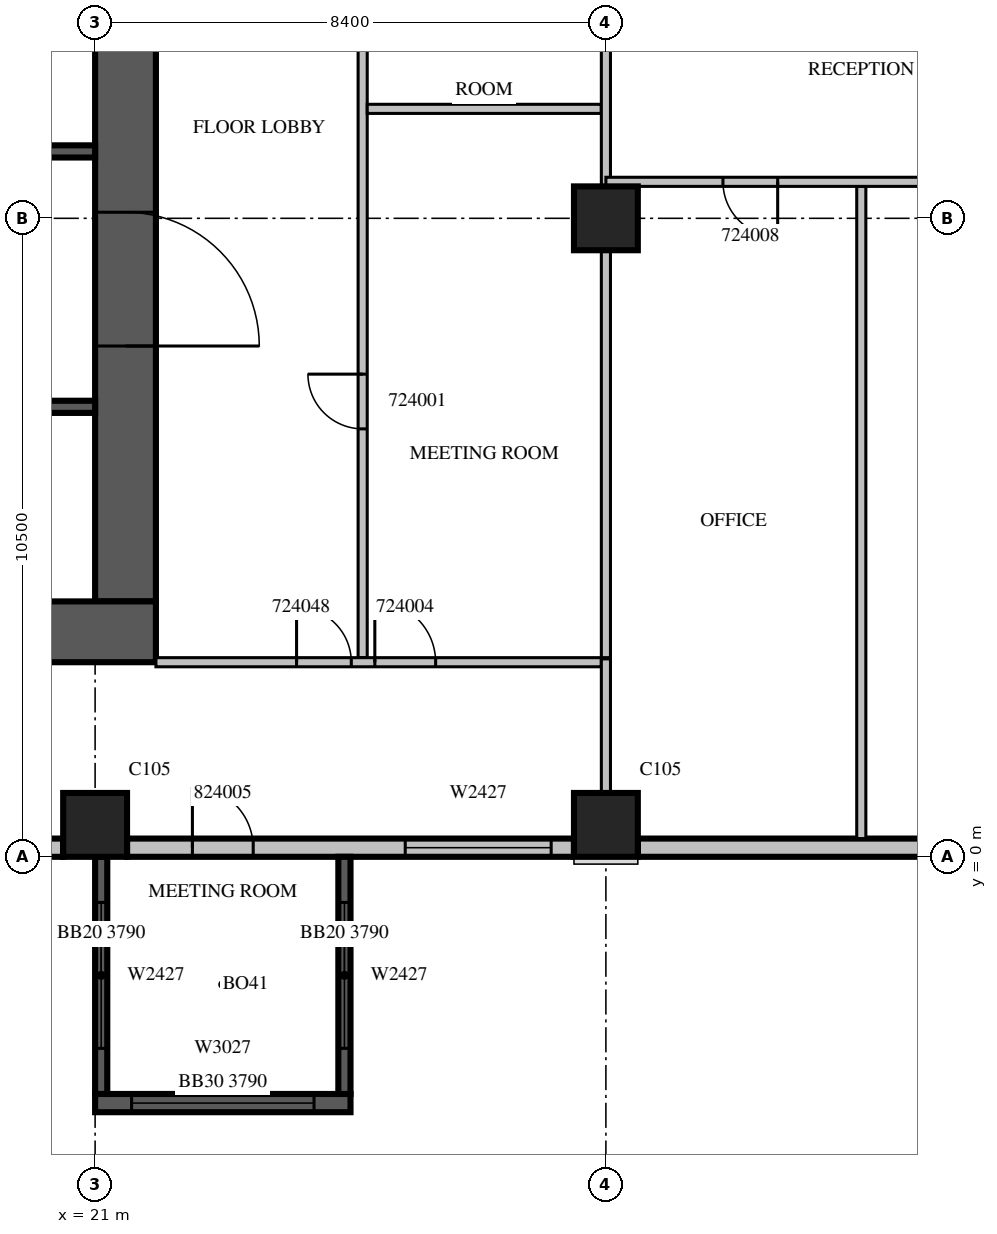
"""IFC4 building model, lengths in metres.
Left out: names, types, materials, properties, quantities, classifications, styles, units other than length and angle.
Written with IfcOpenShell. Run it as: python <this file> out.ifc"""

import sys

from ifc_helpers import new_model, si_unit, direction, frame, frame_2d, origin, origin_2d, place, context, subcontext, project, spatial, rectangle, extrude, source, transform, mapped, element, fill, save


model = new_model("IFC4")
c1 = context("Model", 3, precision=1e-05, world=origin(), true_north=direction((0.0, 1.0)))
c2 = subcontext(c1, "Body", "Model", "MODEL_VIEW")
j1 = project(units=[si_unit("LENGTHUNIT", "METRE"), si_unit("PLANEANGLEUNIT", "RADIAN")], contexts=[c1])
p1 = place(None, origin())
s1 = spatial("IfcSite", under=j1, at=p1, CompositionType="ELEMENT")
p2 = place(p1, origin())
s2 = spatial("IfcBuilding", under=s1, at=p2, CompositionType="ELEMENT")
p3 = place(p2, frame((0.0, 0.0, 111.9)))
s3 = spatial("IfcBuildingStorey", under=s2, at=p3, CompositionType="ELEMENT", Elevation=111.9)
m1 = source(origin(), c2, "Body", "SweptSolid", [
    extrude(rectangle(XDim=1.05, YDim=1.05, at=origin_2d()), origin(), (0.0, 0.0, 1.0), 4.2),
])
for number, where, z_axis, x_axis in (
    (1, (21.0, 0.525, 0.0), (0.0, 0.0, 1.0), (1.0, 0.0, 0.0)),
    (2, (29.4, 0.525, 0.0), (0.0, 0.0, 1.0), (1.0, 0.0, 0.0)),
    (3, (29.4, 10.5, 0.0), (0.0, 0.0, 1.0), (1.0, 0.0, 0.0)),
):
    element("IfcColumn", number, at=place(p3, frame(where, z_axis=z_axis, x_axis=x_axis)), inside=s3, PredefinedType="COLUMN", context=c2, shape_type="MappedRepresentation", body=[
        mapped(m1, transform((0.0, 0.0, 0.0), scale=1.0)),
    ])
m2 = source(origin(), c2, "Body", "SweptSolid", [
    extrude(rectangle(XDim=16.8, YDim=1.0, at=frame_2d((8.4, 0.0))), origin(), (0.0, 0.0, 1.0), 4.2),
])
p4 = place(p3, frame((21.5, 4.2, 0.0), z_axis=(0.0, 0.0, 1.0), x_axis=(0.0, 1.0, 0.0)))
e4 = element("IfcWall", 4, at=p4, inside=s3, PredefinedType="SHEAR", context=c2, shape_type="MappedRepresentation", body=[
    mapped(m2, transform((0.0, 0.0, 0.0), scale=1.0)),
])
m3 = source(origin(), c2, "Body", "SweptSolid", [
    extrude(rectangle(XDim=2.2, YDim=2.1, at=frame_2d((1.1, 1.05))), frame((0.0, 0.51, 0.0), z_axis=(0.0, -1.0, 0.0), x_axis=(1.0, 0.0, 0.0)), (0.0, 0.0, 1.0), 1.02),
])
p5 = place(p4, frame((4.2, 0.0, 0.0)))
e5 = element("IfcOpeningElement", 5, at=p5, cuts=e4, PredefinedType="OPENING", context=c2, shape_type="MappedRepresentation", body=[
    mapped(m3, transform((0.0, 0.0, 0.0), scale=1.0)),
])
m4 = source(origin(), c2, "Body", "SweptSolid", [
    extrude(rectangle(XDim=1.2, YDim=2.1, at=frame_2d((0.6, 1.05))), frame((0.0, 0.51, 0.0), z_axis=(0.0, -1.0, 0.0), x_axis=(1.0, 0.0, 0.0)), (0.0, 0.0, 1.0), 1.02),
])
p6 = place(p4, frame((14.7, 0.0, 0.0)))
e6 = element("IfcOpeningElement", 6, at=p6, cuts=e4, PredefinedType="OPENING", context=c2, shape_type="MappedRepresentation", body=[
    mapped(m4, transform((0.0, 0.0, 0.0), scale=1.0)),
])
m5 = source(origin(), c2, "Body", "SweptSolid", [
    extrude(rectangle(XDim=17.8, YDim=1.0, at=frame_2d((8.9, 0.0))), origin(), (0.0, 0.0, 1.0), 4.2),
])
p7 = place(p3, frame((4.2, 3.7, 0.0), z_axis=(0.0, 0.0, 1.0), x_axis=(1.0, 0.0, 0.0)))
e7 = element("IfcWall", 7, at=p7, inside=s3, PredefinedType="SHEAR", context=c2, shape_type="MappedRepresentation", body=[
    mapped(m5, transform((0.0, 0.0, 0.0), scale=1.0)),
])
m6 = source(origin(), c2, "Body", "SweptSolid", [
    extrude(rectangle(XDim=9.45, YDim=0.3, at=frame_2d((4.725, 0.0))), origin(), (0.0, 0.0, 1.0), 3.8),
])
p8 = place(p3, frame((11.025, 0.15, 0.0), z_axis=(0.0, 0.0, 1.0), x_axis=(1.0, 0.0, 0.0)))
e8 = element("IfcWall", 8, at=p8, inside=s3, PredefinedType="STANDARD", context=c2, shape_type="MappedRepresentation", body=[
    mapped(m6, transform((0.0, 0.0, 0.0), scale=1.0)),
])
m7 = source(origin(), c2, "Body", "SweptSolid", [
    extrude(rectangle(XDim=3.6, YDim=2.7, at=frame_2d((1.8, 1.35))), frame((0.0, 0.16, 0.0), z_axis=(0.0, -1.0, 0.0), x_axis=(1.0, 0.0, 0.0)), (0.0, 0.0, 1.0), 0.32),
])
p9 = place(p8, frame((0.3, 0.0, 0.6)))
e9 = element("IfcOpeningElement", 9, at=p9, cuts=e8, PredefinedType="OPENING", context=c2, shape_type="MappedRepresentation", body=[
    mapped(m7, transform((0.0, 0.0, 0.0), scale=1.0)),
])
p10 = place(p8, frame((5.55, 0.0, 0.6)))
e10 = element("IfcOpeningElement", 10, at=p10, cuts=e8, PredefinedType="OPENING", context=c2, shape_type="MappedRepresentation", body=[
    mapped(m7, transform((0.0, 0.0, 0.0), scale=1.0)),
])
m8 = source(origin(), c2, "Body", "SweptSolid", [
    extrude(rectangle(XDim=7.35, YDim=0.3, at=frame_2d((3.675, 0.0))), origin(), (0.0, 0.0, 1.0), 3.8),
])
p11 = place(p3, frame((21.525, 0.15, 0.0), z_axis=(0.0, 0.0, 1.0), x_axis=(1.0, 0.0, 0.0)))
e11 = element("IfcWall", 11, at=p11, inside=s3, PredefinedType="STANDARD", context=c2, shape_type="MappedRepresentation", body=[
    mapped(m8, transform((0.0, 0.0, 0.0), scale=1.0)),
])
m9 = source(origin(), c2, "Body", "SweptSolid", [
    extrude(rectangle(XDim=2.4, YDim=2.7, at=frame_2d((1.2, 1.35))), frame((0.0, 0.16, 0.0), z_axis=(0.0, -1.0, 0.0), x_axis=(1.0, 0.0, 0.0)), (0.0, 0.0, 1.0), 0.32),
])
p12 = place(p11, frame((4.575, 0.0, 0.6)))
e12 = element("IfcOpeningElement", 12, at=p12, cuts=e11, PredefinedType="OPENING", context=c2, shape_type="MappedRepresentation", body=[
    mapped(m9, transform((0.0, 0.0, 0.0), scale=1.0)),
])
m10 = source(origin(), c2, "Body", "SweptSolid", [
    extrude(rectangle(XDim=1.0, YDim=2.1, at=frame_2d((0.5, 1.05))), frame((0.0, 0.16, 0.0), z_axis=(0.0, -1.0, 0.0), x_axis=(1.0, 0.0, 0.0)), (0.0, 0.0, 1.0), 0.32),
])
p13 = place(p11, frame((1.075, 0.0, 0.0)))
e13 = element("IfcOpeningElement", 13, at=p13, cuts=e11, PredefinedType="OPENING", context=c2, shape_type="MappedRepresentation", body=[
    mapped(m10, transform((0.0, 0.0, 0.0), scale=1.0)),
])
p14 = place(p3, frame((29.925, 0.15, 0.0), z_axis=(0.0, 0.0, 1.0), x_axis=(1.0, 0.0, 0.0)))
e14 = element("IfcWall", 14, at=p14, inside=s3, PredefinedType="STANDARD", context=c2, shape_type="MappedRepresentation", body=[
    mapped(m8, transform((0.0, 0.0, 0.0), scale=1.0)),
])
m11 = source(origin(), c2, "Body", "SweptSolid", [
    extrude(rectangle(XDim=4.2, YDim=0.3, at=frame_2d((2.1, 0.0))), origin(), (0.0, 0.0, 1.0), 3.79),
])
p15 = place(p3, frame((21.0, -4.05, 0.0), z_axis=(0.0, 0.0, 1.0), x_axis=(1.0, 0.0, 0.0)))
e15 = element("IfcWall", 15, at=p15, inside=s3, PredefinedType="SOLIDWALL", context=c2, shape_type="MappedRepresentation", body=[
    mapped(m11, transform((0.0, 0.0, 0.0), scale=1.0)),
])
m12 = source(origin(), c2, "Body", "SweptSolid", [
    extrude(rectangle(XDim=3.0, YDim=2.7, at=frame_2d((1.5, 1.35))), frame((0.0, 0.16, 0.0), z_axis=(0.0, -1.0, 0.0), x_axis=(1.0, 0.0, 0.0)), (0.0, 0.0, 1.0), 0.32),
])
p16 = place(p15, frame((0.6, 0.0, 0.6)))
e16 = element("IfcOpeningElement", 16, at=p16, cuts=e15, PredefinedType="OPENING", context=c2, shape_type="MappedRepresentation", body=[
    mapped(m12, transform((0.0, 0.0, 0.0), scale=1.0)),
])
m13 = source(origin(), c2, "Body", "SweptSolid", [
    extrude(rectangle(XDim=3.9, YDim=0.2, at=frame_2d((1.95, 0.0))), origin(), (0.0, 0.0, 1.0), 3.79),
])
p17 = place(p3, frame((21.1, 0.0, 0.0), z_axis=(0.0, 0.0, 1.0), x_axis=(0.0, -1.0, 0.0)))
e17 = element("IfcWall", 17, at=p17, inside=s3, PredefinedType="SOLIDWALL", context=c2, shape_type="MappedRepresentation", body=[
    mapped(m13, transform((0.0, 0.0, 0.0), scale=1.0)),
])
m14 = source(origin(), c2, "Body", "SweptSolid", [
    extrude(rectangle(XDim=2.4, YDim=2.7, at=frame_2d((1.2, 1.35))), frame((0.0, 0.11, 0.0), z_axis=(0.0, -1.0, 0.0), x_axis=(1.0, 0.0, 0.0)), (0.0, 0.0, 1.0), 0.22),
])
p18 = place(p17, frame((0.75, 0.0, 0.6)))
e18 = element("IfcOpeningElement", 18, at=p18, cuts=e17, PredefinedType="OPENING", context=c2, shape_type="MappedRepresentation", body=[
    mapped(m14, transform((0.0, 0.0, 0.0), scale=1.0)),
])
p19 = place(p3, frame((25.1, 0.0, 0.0), z_axis=(0.0, 0.0, 1.0), x_axis=(0.0, -1.0, 0.0)))
e19 = element("IfcWall", 19, at=p19, inside=s3, PredefinedType="SOLIDWALL", context=c2, shape_type="MappedRepresentation", body=[
    mapped(m13, transform((0.0, 0.0, 0.0), scale=1.0)),
])
p20 = place(p19, frame((0.75, 0.0, 0.6)))
e20 = element("IfcOpeningElement", 20, at=p20, cuts=e19, PredefinedType="OPENING", context=c2, shape_type="MappedRepresentation", body=[
    mapped(m14, transform((0.0, 0.0, 0.0), scale=1.0)),
])
m15 = source(origin(), c2, "Body", "SweptSolid", [
    extrude(rectangle(XDim=16.8, YDim=0.2, at=frame_2d((8.4, 0.0))), origin(), (0.0, 0.0, 1.0), 4.2),
])
p21 = place(p3, frame((4.2, 7.4, 0.0), z_axis=(0.0, 0.0, 1.0), x_axis=(1.0, 0.0, 0.0)))
e21 = element("IfcWall", 21, at=p21, inside=s3, PredefinedType="SOLIDWALL", context=c2, shape_type="MappedRepresentation", body=[
    mapped(m15, transform((0.0, 0.0, 0.0), scale=1.0)),
])
m16 = source(origin(), c2, "Body", "SweptSolid", [
    extrude(rectangle(XDim=1.1, YDim=2.1, at=frame_2d((0.55, 1.05))), frame((0.0, 0.11, 0.0), z_axis=(0.0, -1.0, 0.0), x_axis=(1.0, 0.0, 0.0)), (0.0, 0.0, 1.0), 0.22),
])
p22 = place(p21, frame((0.65, 0.0, 0.0)))
e22 = element("IfcOpeningElement", 22, at=p22, cuts=e21, PredefinedType="OPENING", context=c2, shape_type="MappedRepresentation", body=[
    mapped(m16, transform((0.0, 0.0, 0.0), scale=1.0)),
])
p23 = place(p21, frame((3.05, 0.0, 0.0)))
e23 = element("IfcOpeningElement", 23, at=p23, cuts=e21, PredefinedType="OPENING", context=c2, shape_type="MappedRepresentation", body=[
    mapped(m16, transform((0.0, 0.0, 0.0), scale=1.0)),
])
p24 = place(p21, frame((5.45, 0.0, 0.0)))
e24 = element("IfcOpeningElement", 24, at=p24, cuts=e21, PredefinedType="OPENING", context=c2, shape_type="MappedRepresentation", body=[
    mapped(m16, transform((0.0, 0.0, 0.0), scale=1.0)),
])
p25 = place(p21, frame((7.85, 0.0, 0.0)))
e25 = element("IfcOpeningElement", 25, at=p25, cuts=e21, PredefinedType="OPENING", context=c2, shape_type="MappedRepresentation", body=[
    mapped(m16, transform((0.0, 0.0, 0.0), scale=1.0)),
])
p26 = place(p3, frame((4.2, 11.6, 0.0), z_axis=(0.0, 0.0, 1.0), x_axis=(1.0, 0.0, 0.0)))
e26 = element("IfcWall", 26, at=p26, inside=s3, PredefinedType="SOLIDWALL", context=c2, shape_type="MappedRepresentation", body=[
    mapped(m15, transform((0.0, 0.0, 0.0), scale=1.0)),
])
p27 = place(p26, frame((0.65, 0.0, 0.0)))
e27 = element("IfcOpeningElement", 27, at=p27, cuts=e26, PredefinedType="OPENING", context=c2, shape_type="MappedRepresentation", body=[
    mapped(m16, transform((0.0, 0.0, 0.0), scale=1.0)),
])
p28 = place(p26, frame((3.05, 0.0, 0.0)))
e28 = element("IfcOpeningElement", 28, at=p28, cuts=e26, PredefinedType="OPENING", context=c2, shape_type="MappedRepresentation", body=[
    mapped(m16, transform((0.0, 0.0, 0.0), scale=1.0)),
])
p29 = place(p26, frame((5.45, 0.0, 0.0)))
e29 = element("IfcOpeningElement", 29, at=p29, cuts=e26, PredefinedType="OPENING", context=c2, shape_type="MappedRepresentation", body=[
    mapped(m16, transform((0.0, 0.0, 0.0), scale=1.0)),
])
p30 = place(p3, frame((25.4, 14.7, 0.0), z_axis=(0.0, 0.0, 1.0), x_axis=(0.0, -1.0, 0.0)))
e30 = element("IfcWall", 30, at=p30, inside=s3, PredefinedType="PARTITIONING", context=c2, shape_type="SweptSolid", body=[
    extrude(rectangle(XDim=11.425, YDim=0.15, at=frame_2d((5.713, 0.0))), origin(), (0.0, 0.0, 1.0), 3.8),
])
m17 = source(origin(), c2, "Body", "SweptSolid", [
    extrude(rectangle(XDim=0.9, YDim=2.1, at=frame_2d((0.45, 1.05))), frame((0.0, 0.085, 0.0), z_axis=(0.0, -1.0, 0.0), x_axis=(1.0, 0.0, 0.0)), (0.0, 0.0, 1.0), 0.17),
])
p31 = place(p30, frame((6.763, 0.0, 0.0)))
e31 = element("IfcOpeningElement", 31, at=p31, cuts=e30, PredefinedType="OPENING", context=c2, shape_type="MappedRepresentation", body=[
    mapped(m17, transform((0.0, 0.0, 0.0), scale=1.0)),
])
p32 = place(p30, frame((0.175, 0.0, 0.0)))
e32 = element("IfcOpeningElement", 32, at=p32, cuts=e30, PredefinedType="OPENING", context=c2, shape_type="MappedRepresentation", body=[
    mapped(m17, transform((0.0, 0.0, 0.0), scale=1.0)),
])
m18 = source(origin(), c2, "Body", "SweptSolid", [
    extrude(rectangle(XDim=3.85, YDim=0.15, at=frame_2d((1.925, 0.0))), origin(), (0.0, 0.0, 1.0), 3.8),
])
p33 = place(p3, frame((29.325, 12.3, 0.0), z_axis=(0.0, 0.0, 1.0), x_axis=(-1.0, 0.0, 0.0)))
e33 = element("IfcWall", 33, at=p33, inside=s3, PredefinedType="PARTITIONING", context=c2, shape_type="MappedRepresentation", body=[
    mapped(m18, transform((0.0, 0.0, 0.0), scale=1.0)),
])
m19 = source(origin(), c2, "Body", "SweptSolid", [
    extrude(rectangle(XDim=6.701, YDim=0.15, at=frame_2d((3.35, 0.0))), origin(), (0.0, 0.0, 1.0), 3.8),
])
p34 = place(p3, frame((29.4, 3.275, 0.0), z_axis=(0.0, 0.0, 1.0), x_axis=(0.0, 1.0, 0.0)))
e34 = element("IfcWall", 34, at=p34, inside=s3, PredefinedType="PARTITIONING", context=c2, shape_type="MappedRepresentation", body=[
    mapped(m19, transform((0.0, 0.0, 0.0), scale=1.0)),
])
m20 = source(origin(), c2, "Body", "SweptSolid", [
    extrude(rectangle(XDim=3.676, YDim=0.15, at=frame_2d((1.838, 0.0))), origin(), (0.0, 0.0, 1.0), 3.8),
])
p35 = place(p3, frame((29.4, 11.024, 0.0), z_axis=(0.0, 0.0, 1.0), x_axis=(0.0, 1.0, 0.0)))
e35 = element("IfcWall", 35, at=p35, inside=s3, PredefinedType="PARTITIONING", context=c2, shape_type="MappedRepresentation", body=[
    mapped(m20, transform((0.0, 0.0, 0.0), scale=1.0)),
])
p36 = place(p3, frame((22.0, 3.2, 0.0), z_axis=(0.0, 0.0, 1.0), x_axis=(1.0, 0.0, 0.0)))
e36 = element("IfcWall", 36, at=p36, inside=s3, PredefinedType="PARTITIONING", context=c2, shape_type="SweptSolid", body=[
    extrude(rectangle(XDim=7.325, YDim=0.15, at=frame_2d((3.663, 0.0))), origin(), (0.0, 0.0, 1.0), 3.8),
])
m21 = source(origin(), c2, "Body", "SweptSolid", [
    extrude(rectangle(XDim=1.0, YDim=2.1, at=frame_2d((0.5, 1.05))), frame((0.0, 0.085, 0.0), z_axis=(0.0, -1.0, 0.0), x_axis=(1.0, 0.0, 0.0)), (0.0, 0.0, 1.0), 0.17),
])
p37 = place(p36, frame((3.6, 0.0, 0.0)))
e37 = element("IfcOpeningElement", 37, at=p37, cuts=e36, PredefinedType="OPENING", context=c2, shape_type="MappedRepresentation", body=[
    mapped(m21, transform((0.0, 0.0, 0.0), scale=1.0)),
])
p38 = place(p36, frame((2.313, 0.0, 0.0)))
e38 = element("IfcOpeningElement", 38, at=p38, cuts=e36, PredefinedType="OPENING", context=c2, shape_type="MappedRepresentation", body=[
    mapped(m17, transform((0.0, 0.0, 0.0), scale=1.0)),
])
m22 = source(origin(), c2, "Body", "SweptSolid", [
    extrude(rectangle(XDim=10.725, YDim=0.15, at=frame_2d((5.362, 0.0))), origin(), (0.0, 0.0, 1.0), 3.8),
])
p39 = place(p3, frame((33.6, 0.3, 0.0), z_axis=(0.0, 0.0, 1.0), x_axis=(0.0, 1.0, 0.0)))
e39 = element("IfcWall", 39, at=p39, inside=s3, PredefinedType="PARTITIONING", context=c2, shape_type="MappedRepresentation", body=[
    mapped(m22, transform((0.0, 0.0, 0.0), scale=1.0)),
])
m23 = source(origin(), c2, "Body", "SweptSolid", [
    extrude(rectangle(XDim=2.206, YDim=0.15, at=frame_2d((1.103, 0.0))), origin(), (0.0, 0.0, 1.0), 3.8),
])
p40 = place(p3, frame((29.4, 1.049, 0.0), z_axis=(0.0, 0.0, 1.0), x_axis=(0.0, 1.0, 0.0)))
e40 = element("IfcWall", 40, at=p40, inside=s3, PredefinedType="PARTITIONING", context=c2, shape_type="MappedRepresentation", body=[
    mapped(m23, transform((0.0, 0.0, 0.0), scale=1.0)),
])
m24 = source(origin(), c2, "Body", "SweptSolid", [
    extrude(rectangle(XDim=8.4, YDim=0.15, at=frame_2d((4.2, 0.0))), origin(), (0.0, 0.0, 1.0), 3.8),
])
p41 = place(p3, frame((37.8, 11.1, 0.0), z_axis=(0.0, 0.0, 1.0), x_axis=(-1.0, 0.0, 0.0)))
e41 = element("IfcWall", 41, at=p41, inside=s3, PredefinedType="PARTITIONING", context=c2, shape_type="MappedRepresentation", body=[
    mapped(m24, transform((0.0, 0.0, 0.0), scale=1.0)),
])
p42 = place(p41, frame((5.575, 0.0, 0.0)))
e42 = element("IfcOpeningElement", 42, at=p42, cuts=e41, PredefinedType="OPENING", context=c2, shape_type="MappedRepresentation", body=[
    mapped(m17, transform((0.0, 0.0, 0.0), scale=1.0)),
])
p43 = place(p41, frame((1.875, 0.0, 0.0)))
e43 = element("IfcOpeningElement", 43, at=p43, cuts=e41, PredefinedType="OPENING", context=c2, shape_type="MappedRepresentation", body=[
    mapped(m17, transform((0.0, 0.0, 0.0), scale=1.0)),
])
m25 = source(origin(), c2, "Body", "SweptSolid", [
    extrude(rectangle(XDim=2.4, YDim=2.7, at=frame_2d((1.2, 1.35))), frame((0.0, 0.03, 0.0), z_axis=(0.0, -1.0, 0.0), x_axis=(1.0, 0.0, 0.0)), (0.0, 0.0, 1.0), 0.06),
])
p44 = place(p12, origin())
e44 = element("IfcWindow", 44, at=p44, inside=s3, PartitioningType="SINGLE_PANEL", PredefinedType="WINDOW", context=c2, shape_type="MappedRepresentation", body=[
    mapped(m25, transform((0.0, 0.0, 0.0), scale=1.0)),
])
fill(e12, e44)
m26 = source(origin(), c2, "Body", "SweptSolid", [
    extrude(rectangle(XDim=3.0, YDim=2.7, at=frame_2d((1.5, 1.35))), frame((0.0, 0.03, 0.0), z_axis=(0.0, -1.0, 0.0), x_axis=(1.0, 0.0, 0.0)), (0.0, 0.0, 1.0), 0.06),
])
p45 = place(p16, origin())
e45 = element("IfcWindow", 45, at=p45, inside=s3, PartitioningType="SINGLE_PANEL", PredefinedType="WINDOW", context=c2, shape_type="MappedRepresentation", body=[
    mapped(m26, transform((0.0, 0.0, 0.0), scale=1.0)),
])
fill(e16, e45)
p46 = place(p18, origin())
e46 = element("IfcWindow", 46, at=p46, inside=s3, PartitioningType="SINGLE_PANEL", PredefinedType="WINDOW", context=c2, shape_type="MappedRepresentation", body=[
    mapped(m25, transform((0.0, 0.0, 0.0), scale=1.0)),
])
fill(e18, e46)
p47 = place(p20, origin())
e47 = element("IfcWindow", 47, at=p47, inside=s3, PartitioningType="SINGLE_PANEL", PredefinedType="WINDOW", context=c2, shape_type="MappedRepresentation", body=[
    mapped(m25, transform((0.0, 0.0, 0.0), scale=1.0)),
])
fill(e20, e47)
m27 = source(origin(), c2, "Body", "SweptSolid", [
    extrude(rectangle(XDim=2.2, YDim=2.1, at=frame_2d((1.1, 1.05))), frame((0.0, 0.025, 0.0), z_axis=(0.0, -1.0, 0.0), x_axis=(1.0, 0.0, 0.0)), (0.0, 0.0, 1.0), 0.05),
])
p48 = place(p5, origin())
e48 = element("IfcDoor", 48, at=p48, inside=s3, OperationType="DOUBLE_DOOR_SINGLE_SWING", PredefinedType="DOOR", context=c2, shape_type="MappedRepresentation", body=[
    mapped(m27, transform((0.0, 0.0, 0.0), scale=1.0)),
])
fill(e5, e48)
m28 = source(origin(), c2, "Body", "SweptSolid", [
    extrude(rectangle(XDim=0.9, YDim=2.1, at=frame_2d((0.45, 1.05))), frame((0.0, 0.025, 0.0), z_axis=(0.0, -1.0, 0.0), x_axis=(1.0, 0.0, 0.0)), (0.0, 0.0, 1.0), 0.05),
])
p49 = place(p31, origin())
e49 = element("IfcDoor", 49, at=p49, inside=s3, OperationType="SINGLE_SWING_RIGHT", PredefinedType="DOOR", context=c2, shape_type="MappedRepresentation", body=[
    mapped(m28, transform((0.0, 0.0, 0.0), scale=1.0)),
])
fill(e31, e49)
m29 = source(origin(), c2, "Body", "SweptSolid", [
    extrude(rectangle(XDim=1.0, YDim=2.1, at=frame_2d((0.5, 1.05))), frame((0.0, 0.025, 0.0), z_axis=(0.0, -1.0, 0.0), x_axis=(1.0, 0.0, 0.0)), (0.0, 0.0, 1.0), 0.05),
])
p50 = place(p37, origin())
e50 = element("IfcDoor", 50, at=p50, inside=s3, OperationType="SINGLE_SWING_LEFT", PredefinedType="DOOR", context=c2, shape_type="MappedRepresentation", body=[
    mapped(m29, transform((0.0, 0.0, 0.0), scale=1.0)),
])
fill(e37, e50)
p51 = place(p42, origin())
e51 = element("IfcDoor", 51, at=p51, inside=s3, OperationType="SINGLE_SWING_LEFT", PredefinedType="DOOR", context=c2, shape_type="MappedRepresentation", body=[
    mapped(m28, transform((0.0, 0.0, 0.0), scale=1.0)),
])
fill(e42, e51)
p52 = place(p38, origin())
e52 = element("IfcDoor", 52, at=p52, inside=s3, OperationType="SINGLE_SWING_LEFT", PredefinedType="DOOR", context=c2, shape_type="MappedRepresentation", body=[
    mapped(m28, transform((0.0, 0.0, 0.0), scale=1.0)),
])
fill(e38, e52)
p53 = place(p13, origin())
e53 = element("IfcDoor", 53, at=p53, inside=s3, OperationType="SINGLE_SWING_LEFT", PredefinedType="DOOR", context=c2, shape_type="MappedRepresentation", body=[
    mapped(m29, transform((0.0, 0.0, 0.0), scale=1.0)),
])
fill(e13, e53)
save(model, sys.argv[1])
